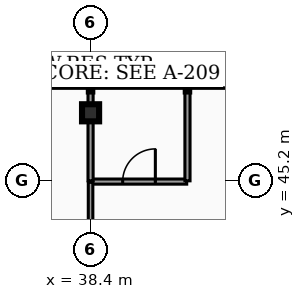
"""IFC4 building model, lengths in metres.
Left out: names, types, materials, properties, quantities, classifications, styles, units other than length and angle.
Written with IfcOpenShell. Run it as: python <this file> out.ifc"""

import sys

from ifc_helpers import new_model, si_unit, direction, frame, frame_2d, origin, origin_2d, place, context, subcontext, project, spatial, rectangle, hollow_rectangle, extrude, element, fill, save


model = new_model("IFC4")
c1 = context("Model", 3, precision=1e-05, world=origin(), true_north=direction((0.0, 1.0)))
c2 = subcontext(c1, "Body", "Model", "MODEL_VIEW")
j1 = project(units=[si_unit("LENGTHUNIT", "METRE"), si_unit("PLANEANGLEUNIT", "RADIAN")], contexts=[c1])
p1 = place(None, origin())
s1 = spatial("IfcSite", under=j1, at=p1, CompositionType="ELEMENT")
p2 = place(p1, origin())
s2 = spatial("IfcBuilding", under=s1, at=p2, CompositionType="ELEMENT")
p3 = place(p2, frame((0.0, 0.0, 285.6)))
s3 = spatial("IfcBuildingStorey", under=s2, at=p3, CompositionType="ELEMENT", Elevation=285.6)
p4 = place(p3, frame((38.4, 46.983, 0.0), z_axis=(-0.04858543316, -0.036630657808, 0.998147108693), x_axis=(0.602013203522, -0.798486131868, 0.0)))
e1 = element("IfcColumn", 1, at=p4, inside=s3, PredefinedType="COLUMN", context=c2, shape_type="SweptSolid", body=[
    extrude(hollow_rectangle(XDim=0.45, YDim=0.45, WallThickness=0.022, at=origin_2d()), origin(), (0.0, 0.0, 1.0), 3.186),
])
p5 = place(p3, frame((38.42, 45.173, 0.0), z_axis=(0.0, 0.0, 1.0), x_axis=(1.0, 0.0, 0.0)))
e2 = element("IfcWall", 2, at=p5, inside=s3, PredefinedType="PARTITIONING", context=c2, shape_type="SweptSolid", body=[
    extrude(rectangle(XDim=2.51, YDim=0.135, at=frame_2d((1.255, 0.0))), origin(), (0.0, 0.0, 1.0), 2.235),
])
p6 = place(p5, frame((0.825, 0.0, 0.0)))
e3 = element("IfcOpeningElement", 3, at=p6, cuts=e2, PredefinedType="OPENING", context=c2, shape_type="SweptSolid", body=[
    extrude(rectangle(XDim=0.86, YDim=2.05, at=frame_2d((0.43, 1.025))), frame((0.0, 0.077, 0.0), z_axis=(0.0, -1.0, 0.0), x_axis=(1.0, 0.0, 0.0)), (0.0, 0.0, 1.0), 0.155),
])
p7 = place(p3, frame((40.95, 45.193, 0.0), z_axis=(0.0, 0.0, 1.0), x_axis=(0.0, 1.0, 0.0)))
e4 = element("IfcWall", 4, at=p7, inside=s3, PredefinedType="PARTITIONING", context=c2, shape_type="SweptSolid", body=[
    extrude(rectangle(XDim=2.425, YDim=0.135, at=frame_2d((1.212, 0.0))), origin(), (0.0, 0.0, 1.0), 2.235),
])
p8 = place(p3, frame((38.4, 43.415, 0.0), z_axis=(0.0, 0.0, 1.0), x_axis=(0.0, 1.0, 0.0)))
e5 = element("IfcWall", 5, at=p8, inside=s3, PredefinedType="PARTITIONING", context=c2, shape_type="SweptSolid", body=[
    extrude(rectangle(XDim=1.738, YDim=0.12, at=frame_2d((0.869, 0.0))), origin(), (0.0, 0.0, 1.0), 2.235),
])
p9 = place(p3, frame((38.4, 45.193, 0.0), z_axis=(0.0, 0.0, 1.0), x_axis=(0.0, 1.0, 0.0)))
e6 = element("IfcWall", 6, at=p9, inside=s3, PredefinedType="PARTITIONING", context=c2, shape_type="SweptSolid", body=[
    extrude(rectangle(XDim=2.425, YDim=0.135, at=frame_2d((1.212, 0.0))), origin(), (0.0, 0.0, 1.0), 2.235),
])
p10 = place(p6, origin())
e7 = element("IfcDoor", 7, at=p10, inside=s3, OperationType="SINGLE_SWING_RIGHT", PredefinedType="DOOR", context=c2, shape_type="SweptSolid", body=[
    extrude(rectangle(XDim=0.86, YDim=2.05, at=frame_2d((0.43, 1.025))), frame((0.0, 0.025, 0.0), z_axis=(0.0, -1.0, 0.0), x_axis=(1.0, 0.0, 0.0)), (0.0, 0.0, 1.0), 0.05),
])
fill(e3, e7)
save(model, sys.argv[1])
